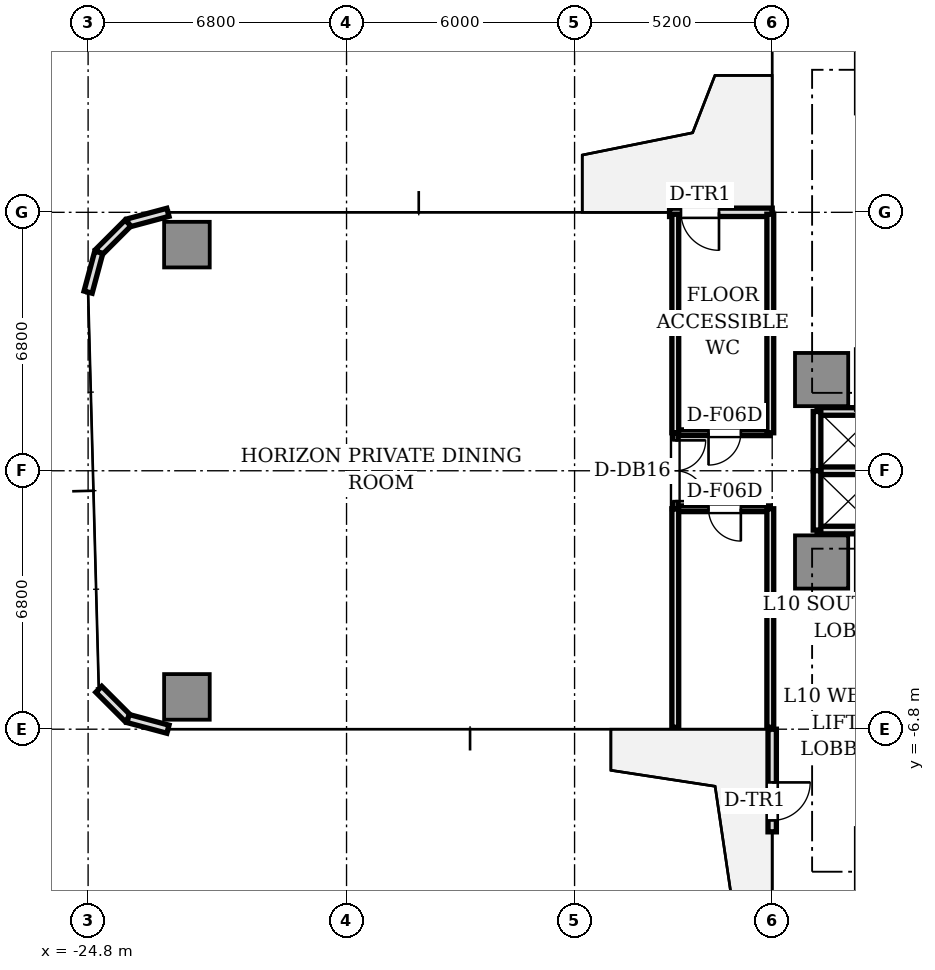
"""IFC4 building model, lengths in metres.
Left out: names, types, materials, properties, quantities, classifications, styles, units other than length and angle.
Written with IfcOpenShell. Run it as: python <this file> out.ifc"""

import sys

from ifc_helpers import new_model, si_unit, direction, frame, frame_2d, origin, origin_2d, place, context, subcontext, project, spatial, rectangle, extrude, source, transform, mapped, element, fill, save


model = new_model("IFC4")
c1 = context("Model", 3, precision=1e-05, world=origin(), true_north=direction((0.0, 1.0)))
c2 = subcontext(c1, "Body", "Model", "MODEL_VIEW")
j1 = project(units=[si_unit("LENGTHUNIT", "METRE"), si_unit("PLANEANGLEUNIT", "RADIAN")], contexts=[c1])
p1 = place(None, origin())
s1 = spatial("IfcSite", under=j1, at=p1, CompositionType="ELEMENT")
p2 = place(p1, origin())
s2 = spatial("IfcBuilding", under=s1, at=p2, CompositionType="ELEMENT")
p3 = place(p2, frame((0.0, 0.0, 39.85)))
s3 = spatial("IfcBuildingStorey", under=s2, at=p3, CompositionType="ELEMENT", Elevation=39.85)
m1 = source(origin(), c2, "Body", "SweptSolid", [
    extrude(rectangle(XDim=1.4, YDim=1.4, at=origin_2d()), origin(), (0.0, 0.0, 1.0), 3.11),
])
for number, where, z_axis, x_axis in (
    (1, (-5.5, 2.4, 0.0), (0.0, 0.0, 1.0), (1.0, 0.0, 0.0)),
    (2, (-5.5, -2.4, 0.0), (0.0, 0.0, 1.0), (1.0, 0.0, 0.0)),
):
    element("IfcColumn", number, at=place(p3, frame(where, z_axis=z_axis, x_axis=x_axis)), inside=s3, PredefinedType="COLUMN", context=c2, shape_type="MappedRepresentation", body=[
        mapped(m1, transform((0.0, 0.0, 0.0), scale=1.0)),
    ])
m2 = source(origin(), c2, "Body", "SweptSolid", [
    extrude(rectangle(XDim=1.2, YDim=1.2, at=origin_2d()), origin(), (0.0, 0.0, 1.0), 3.11),
])
for number, where, z_axis, x_axis in (
    (3, (-22.2, 5.95, 0.0), (0.0, 0.0, 1.0), (1.0, 0.0, 0.0)),
    (4, (-22.2, -5.95, 0.0), (0.0, 0.0, 1.0), (1.0, 0.0, 0.0)),
):
    element("IfcColumn", number, at=place(p3, frame(where, z_axis=z_axis, x_axis=x_axis)), inside=s3, PredefinedType="COLUMN", context=c2, shape_type="MappedRepresentation", body=[
        mapped(m2, transform((0.0, 0.0, 0.0), scale=1.0)),
    ])
p4 = place(p3, frame((-6.8, 6.8, 0.0), z_axis=(0.0, 0.0, 1.0), x_axis=(-1.0, 0.0, 0.0)))
e5 = element("IfcWall", 5, at=p4, inside=s3, PredefinedType="STANDARD", context=c2, shape_type="SweptSolid", body=[
    extrude(rectangle(XDim=2.7, YDim=0.22, at=frame_2d((1.35, 0.0))), origin(), (0.0, 0.0, 1.0), 3.11),
])
p5 = place(p4, frame((1.4, 0.0, 0.0)))
e6 = element("IfcOpeningElement", 6, at=p5, cuts=e5, PredefinedType="OPENING", context=c2, shape_type="SweptSolid", body=[
    extrude(rectangle(XDim=1.0, YDim=2.2, at=frame_2d((0.5, 1.1))), frame((0.0, 0.12, 0.0), z_axis=(0.0, -1.0, 0.0), x_axis=(1.0, 0.0, 0.0)), (0.0, 0.0, 1.0), 0.24),
])
for number, where, z_axis, x_axis in (
    (7, (-22.7, 6.8, 0.0), (0.0, 0.0, 1.0), (-0.966, -0.259, 0.0)),
    (8, (-23.75, 6.519, 0.0), (0.0, 0.0, 1.0), (-0.707, -0.707, 0.0)),
    (9, (-24.519, 5.75, 0.0), (0.0, 0.0, 1.0), (-0.259, -0.966, 0.0)),
    (10, (-24.519, -5.75, 0.0), (0.0, 0.0, 1.0), (0.707, -0.707, 0.0)),
    (11, (-23.75, -6.519, 0.0), (0.0, 0.0, 1.0), (0.966, -0.259, 0.0)),
):
    element("IfcWall", number, at=place(p3, frame(where, z_axis=z_axis, x_axis=x_axis)), inside=s3, PredefinedType="STANDARD", context=c2, shape_type="SweptSolid", body=[
        extrude(rectangle(XDim=1.087, YDim=0.22, at=frame_2d((0.543, 0.0))), origin(), (0.0, 0.0, 1.0), 3.11),
    ])
p6 = place(p3, frame((-6.8, -6.8, 0.0), z_axis=(0.0, 0.0, 1.0), x_axis=(0.0, -1.0, 0.0)))
e12 = element("IfcWall", 12, at=p6, inside=s3, PredefinedType="STANDARD", context=c2, shape_type="SweptSolid", body=[
    extrude(rectangle(XDim=2.7, YDim=0.22, at=frame_2d((1.35, 0.0))), origin(), (0.0, 0.0, 1.0), 3.11),
])
p7 = place(p6, frame((1.4, 0.0, 0.0)))
e13 = element("IfcOpeningElement", 13, at=p7, cuts=e12, PredefinedType="OPENING", context=c2, shape_type="SweptSolid", body=[
    extrude(rectangle(XDim=1.0, YDim=2.2, at=frame_2d((0.5, 1.1))), frame((0.0, 0.12, 0.0), z_axis=(0.0, -1.0, 0.0), x_axis=(1.0, 0.0, 0.0)), (0.0, 0.0, 1.0), 0.24),
])
for number, where, z_axis, x_axis in (
    (14, (-5.62, 1.56, 0.0), (0.0, 0.0, 1.0), (1.0, 0.0, 0.0)),
    (15, (-5.62, -1.56, 0.0), (0.0, 0.0, 1.0), (1.0, 0.0, 0.0)),
    (16, (-5.62, 0.0, 0.0), (0.0, 0.0, 1.0), (1.0, 0.0, 0.0)),
):
    element("IfcWall", number, at=place(p3, frame(where, z_axis=z_axis, x_axis=x_axis)), inside=s3, PredefinedType="SOLIDWALL", context=c2, shape_type="SweptSolid", body=[
        extrude(rectangle(XDim=1.64, YDim=0.2, at=frame_2d((0.82, 0.0))), origin(), (0.0, 0.0, 1.0), 2.66),
    ])
for number, where, z_axis, x_axis in (
    (17, (-5.62, 0.0, 0.0), (0.0, 0.0, 1.0), (0.0, 1.0, 0.0)),
    (18, (-5.62, -1.56, 0.0), (0.0, 0.0, 1.0), (0.0, 1.0, 0.0)),
):
    element("IfcWall", number, at=place(p3, frame(where, z_axis=z_axis, x_axis=x_axis)), inside=s3, PredefinedType="SOLIDWALL", context=c2, shape_type="SweptSolid", body=[
        extrude(rectangle(XDim=1.56, YDim=0.2, at=frame_2d((0.78, 0.0))), origin(), (0.0, 0.0, 1.0), 2.66),
    ])
p8 = place(p3, frame((-6.85, -1.0, 0.0), z_axis=(0.0, 0.0, 1.0), x_axis=(-1.0, 0.0, 0.0)))
e19 = element("IfcWall", 19, at=p8, inside=s3, PredefinedType="PARTITIONING", context=c2, shape_type="SweptSolid", body=[
    extrude(rectangle(XDim=2.5, YDim=0.15, at=frame_2d((1.25, 0.0))), origin(), (0.0, 0.0, 1.0), 2.66),
])
p9 = place(p8, frame((0.775, 0.0, 0.0)))
e20 = element("IfcOpeningElement", 20, at=p9, cuts=e19, PredefinedType="OPENING", context=c2, shape_type="SweptSolid", body=[
    extrude(rectangle(XDim=0.85, YDim=2.1, at=frame_2d((0.425, 1.05))), frame((0.0, 0.085, 0.0), z_axis=(0.0, -1.0, 0.0), x_axis=(1.0, 0.0, 0.0)), (0.0, 0.0, 1.0), 0.17),
])
p10 = place(p3, frame((-6.85, 1.0, 0.0), z_axis=(0.0, 0.0, 1.0), x_axis=(-1.0, 0.0, 0.0)))
e21 = element("IfcWall", 21, at=p10, inside=s3, PredefinedType="PARTITIONING", context=c2, shape_type="SweptSolid", body=[
    extrude(rectangle(XDim=2.5, YDim=0.15, at=frame_2d((1.25, 0.0))), origin(), (0.0, 0.0, 1.0), 2.66),
])
p11 = place(p10, frame((0.775, 0.0, 0.0)))
e22 = element("IfcOpeningElement", 22, at=p11, cuts=e21, PredefinedType="OPENING", context=c2, shape_type="SweptSolid", body=[
    extrude(rectangle(XDim=0.85, YDim=2.1, at=frame_2d((0.425, 1.05))), frame((0.0, 0.085, 0.0), z_axis=(0.0, -1.0, 0.0), x_axis=(1.0, 0.0, 0.0)), (0.0, 0.0, 1.0), 0.17),
])
for number, where, z_axis, x_axis in (
    (23, (-6.85, -1.0, 0.0), (0.0, 0.0, 1.0), (0.0, -1.0, 0.0)),
    (24, (-6.85, 6.75, 0.0), (0.0, 0.0, 1.0), (0.0, -1.0, 0.0)),
    (25, (-9.35, 1.0, 0.0), (0.0, 0.0, 1.0), (0.0, 1.0, 0.0)),
    (26, (-9.35, -1.0, 0.0), (0.0, 0.0, 1.0), (0.0, -1.0, 0.0)),
):
    element("IfcWall", number, at=place(p3, frame(where, z_axis=z_axis, x_axis=x_axis)), inside=s3, PredefinedType="PARTITIONING", context=c2, shape_type="SweptSolid", body=[
        extrude(rectangle(XDim=5.75, YDim=0.18, at=frame_2d((2.875, 0.0))), origin(), (0.0, 0.0, 1.0), 2.66),
    ])
p12 = place(p3, frame((-9.35, 1.0, 0.0), z_axis=(0.0, 0.0, 1.0), x_axis=(0.0, -1.0, 0.0)))
e27 = element("IfcWall", 27, at=p12, inside=s3, PredefinedType="PARTITIONING", context=c2, shape_type="SweptSolid", body=[
    extrude(rectangle(XDim=2.0, YDim=0.15, at=frame_2d((1.0, 0.0))), origin(), (0.0, 0.0, 1.0), 2.66),
])
p13 = place(p12, frame((0.2, 0.0, 0.0)))
e28 = element("IfcOpeningElement", 28, at=p13, cuts=e27, PredefinedType="OPENING", context=c2, shape_type="SweptSolid", body=[
    extrude(rectangle(XDim=1.6, YDim=2.25, at=frame_2d((0.8, 1.125))), frame((0.0, 0.085, 0.0), z_axis=(0.0, -1.0, 0.0), x_axis=(1.0, 0.0, 0.0)), (0.0, 0.0, 1.0), 0.17),
])
m3 = source(origin(), c2, "Body", "SweptSolid", [
    extrude(rectangle(XDim=1.0, YDim=0.05, at=origin_2d()), origin(), (0.0, 0.0, 1.0), 2.2),
])
p14 = place(p5, frame((0.5, 0.0, 0.0)))
e29 = element("IfcDoor", 29, at=p14, inside=s3, OperationType="SINGLE_SWING_LEFT", PredefinedType="DOOR", context=c2, shape_type="MappedRepresentation", body=[
    mapped(m3, transform((0.0, 0.0, 0.0), scale=1.0)),
])
fill(e6, e29)
p15 = place(p7, frame((0.5, 0.0, 0.0)))
e30 = element("IfcDoor", 30, at=p15, inside=s3, OperationType="SINGLE_SWING_LEFT", PredefinedType="DOOR", context=c2, shape_type="MappedRepresentation", body=[
    mapped(m3, transform((0.0, 0.0, 0.0), scale=1.0)),
])
fill(e13, e30)
m4 = source(origin(), c2, "Body", "SweptSolid", [
    extrude(rectangle(XDim=0.85, YDim=0.05, at=origin_2d()), origin(), (0.0, 0.0, 1.0), 2.1),
])
p16 = place(p11, frame((0.425, 0.0, 0.0)))
e31 = element("IfcDoor", 31, at=p16, inside=s3, OperationType="SINGLE_SWING_RIGHT", PredefinedType="DOOR", context=c2, shape_type="MappedRepresentation", body=[
    mapped(m4, transform((0.0, 0.0, 0.0), scale=1.0)),
])
fill(e22, e31)
p17 = place(p9, frame((0.425, 0.0, 0.0)))
e32 = element("IfcDoor", 32, at=p17, inside=s3, OperationType="SINGLE_SWING_LEFT", PredefinedType="DOOR", context=c2, shape_type="MappedRepresentation", body=[
    mapped(m4, transform((0.0, 0.0, 0.0), scale=1.0)),
])
fill(e20, e32)
m5 = source(origin(), c2, "Body", "SweptSolid", [
    extrude(rectangle(XDim=1.6, YDim=0.05, at=origin_2d()), origin(), (0.0, 0.0, 1.0), 2.25),
])
p18 = place(p13, frame((0.8, 0.0, 0.0)))
e33 = element("IfcDoor", 33, at=p18, inside=s3, OperationType="DOUBLE_DOOR_SINGLE_SWING", PredefinedType="DOOR", context=c2, shape_type="MappedRepresentation", body=[
    mapped(m5, transform((0.0, 0.0, 0.0), scale=1.0)),
])
fill(e28, e33)
save(model, sys.argv[1])
